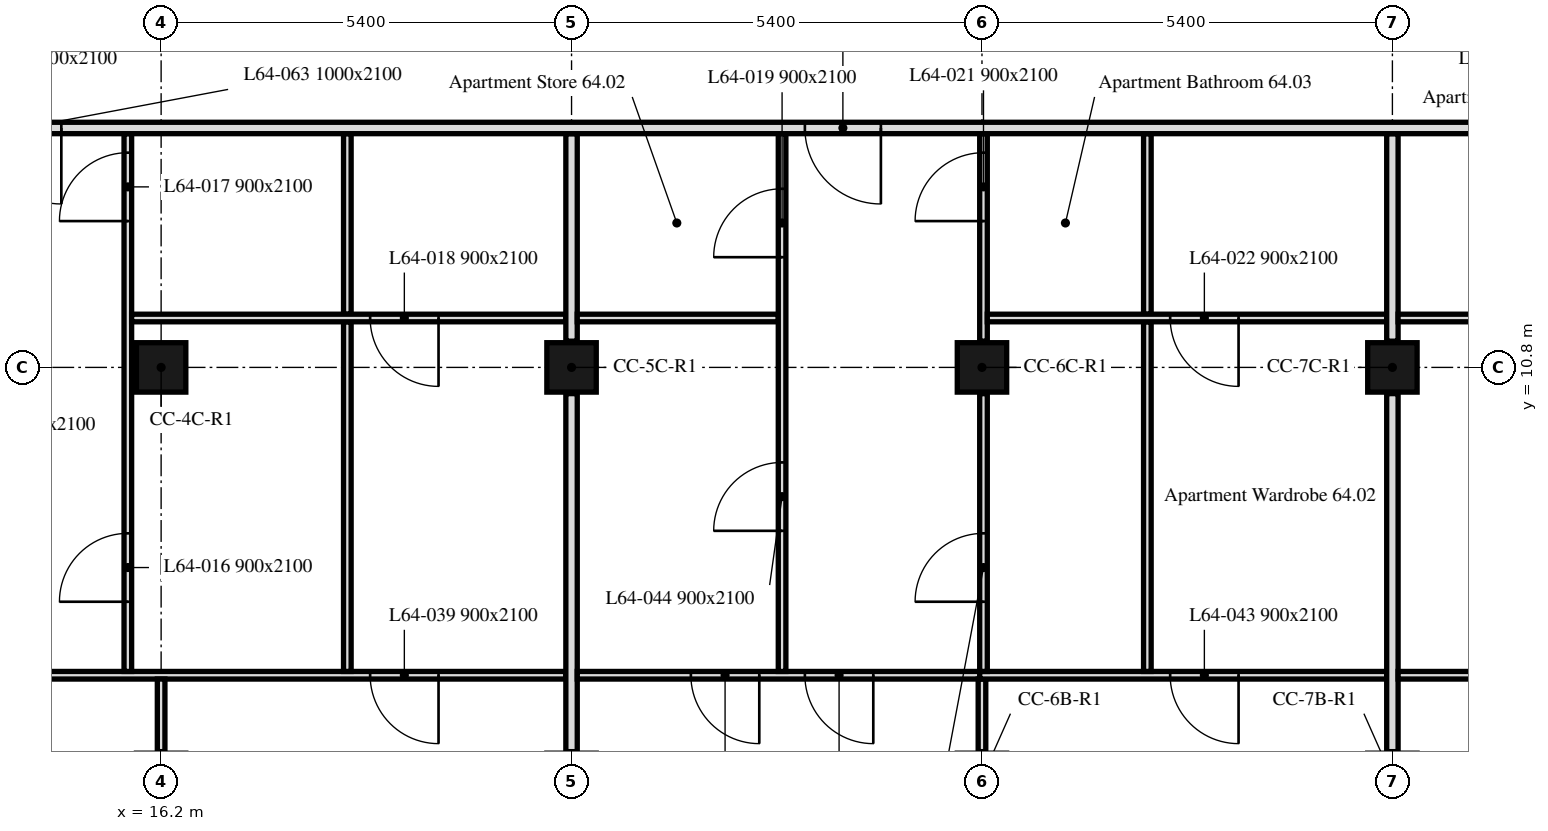
"""IFC4 building model, lengths in metres.
Left out: names, types, materials, properties, quantities, classifications, styles, units other than length and angle.
Written with IfcOpenShell. Run it as: python <this file> out.ifc"""

import sys

from ifc_helpers import new_model, si_unit, direction, frame, frame_2d, origin, origin_2d, place, context, subcontext, project, spatial, rectangle, extrude, element, fill, save


model = new_model("IFC4")
c1 = context("Model", 3, precision=1e-05, world=origin(), true_north=direction((0.0, 1.0)))
c2 = subcontext(c1, "Body", "Model", "MODEL_VIEW")
j1 = project(units=[si_unit("LENGTHUNIT", "METRE"), si_unit("PLANEANGLEUNIT", "RADIAN")], contexts=[c1])
p1 = place(None, origin())
s1 = spatial("IfcSite", under=j1, at=p1, CompositionType="ELEMENT")
p2 = place(p1, origin())
s2 = spatial("IfcBuilding", under=s1, at=p2, CompositionType="ELEMENT")
p3 = place(p2, frame((0.0, 0.0, 265.3)))
s3 = spatial("IfcBuildingStorey", under=s2, at=p3, CompositionType="ELEMENT", Elevation=265.3)
for number, where, z_axis, x_axis in (
    (1, (16.2, 10.8, 0.0), (0.0, 0.0, 1.0), (1.0, 0.0, 0.0)),
    (2, (21.6, 10.8, 0.0), (0.0, 0.0, 1.0), (1.0, 0.0, 0.0)),
    (3, (27.0, 10.8, 0.0), (0.0, 0.0, 1.0), (1.0, 0.0, 0.0)),
    (4, (32.4, 10.8, 0.0), (0.0, 0.0, 1.0), (1.0, 0.0, 0.0)),
):
    element("IfcColumn", number, at=place(p3, frame(where, z_axis=z_axis, x_axis=x_axis)), inside=s3, PredefinedType="COLUMN", context=c2, shape_type="SweptSolid", body=[
        extrude(rectangle(XDim=0.65, YDim=0.65, at=origin_2d()), origin(), (0.0, 0.0, 1.0), 3.0),
    ])
p4 = place(p3, frame((21.525, 6.75, 0.0), z_axis=(0.0, 0.0, 1.0), x_axis=(-1.0, 0.0, 0.0)))
e5 = element("IfcWall", 5, at=p4, inside=s3, PredefinedType="PARTITIONING", context=c2, shape_type="SweptSolid", body=[
    extrude(rectangle(XDim=10.65, YDim=0.1, at=frame_2d((5.325, 0.0))), origin(), (0.0, 0.0, 1.0), 2.4),
])
p5 = place(p4, frame((8.813, 0.0, 0.0)))
e6 = element("IfcOpeningElement", 6, at=p5, cuts=e5, PredefinedType="OPENING", context=c2, shape_type="SweptSolid", body=[
    extrude(rectangle(XDim=0.9, YDim=2.1, at=frame_2d((0.45, 1.05))), frame((0.0, 0.05, 0.0), z_axis=(0.0, -1.0, 0.0), x_axis=(1.0, 0.0, 0.0)), (0.0, 0.0, 1.0), 0.1),
])
p6 = place(p4, frame((1.675, 0.0, 0.0)))
e7 = element("IfcOpeningElement", 7, at=p6, cuts=e5, PredefinedType="OPENING", context=c2, shape_type="SweptSolid", body=[
    extrude(rectangle(XDim=0.9, YDim=2.1, at=frame_2d((0.45, 1.05))), frame((0.0, 0.05, 0.0), z_axis=(0.0, -1.0, 0.0), x_axis=(1.0, 0.0, 0.0)), (0.0, 0.0, 1.0), 0.1),
])
p7 = place(p4, frame((7.313, 0.0, 0.0)))
e8 = element("IfcOpeningElement", 8, at=p7, cuts=e5, PredefinedType="OPENING", context=c2, shape_type="SweptSolid", body=[
    extrude(rectangle(XDim=0.9, YDim=2.1, at=frame_2d((0.45, 1.05))), frame((0.0, 0.05, 0.0), z_axis=(0.0, -1.0, 0.0), x_axis=(1.0, 0.0, 0.0)), (0.0, 0.0, 1.0), 0.1),
])
p8 = place(p3, frame((16.2, 5.745, 0.0), z_axis=(0.0, 0.0, 1.0), x_axis=(0.0, 1.0, 0.0)))
e9 = element("IfcWall", 9, at=p8, inside=s3, PredefinedType="PARTITIONING", context=c2, shape_type="SweptSolid", body=[
    extrude(rectangle(XDim=0.955, YDim=0.1, at=frame_2d((0.478, 0.0))), origin(), (0.0, 0.0, 1.0), 2.4),
])
p9 = place(p3, frame((15.762, 6.8, 0.0), z_axis=(0.0, 0.0, 1.0), x_axis=(0.0, 1.0, 0.0)))
e10 = element("IfcWall", 10, at=p9, inside=s3, PredefinedType="PARTITIONING", context=c2, shape_type="SweptSolid", body=[
    extrude(rectangle(XDim=7.075, YDim=0.1, at=frame_2d((3.538, 0.0))), origin(), (0.0, 0.0, 1.0), 3.0),
])
p10 = place(p9, frame((0.917, 0.0, 0.0)))
e11 = element("IfcOpeningElement", 11, at=p10, cuts=e10, PredefinedType="OPENING", context=c2, shape_type="SweptSolid", body=[
    extrude(rectangle(XDim=0.9, YDim=2.1, at=frame_2d((0.45, 1.05))), frame((0.0, 0.05, 0.0), z_axis=(0.0, -1.0, 0.0), x_axis=(1.0, 0.0, 0.0)), (0.0, 0.0, 1.0), 0.1),
])
p11 = place(p9, frame((5.925, 0.0, 0.0)))
e12 = element("IfcOpeningElement", 12, at=p11, cuts=e10, PredefinedType="OPENING", context=c2, shape_type="SweptSolid", body=[
    extrude(rectangle(XDim=0.9, YDim=2.1, at=frame_2d((0.45, 1.05))), frame((0.0, 0.05, 0.0), z_axis=(0.0, -1.0, 0.0), x_axis=(1.0, 0.0, 0.0)), (0.0, 0.0, 1.0), 0.1),
])
p12 = place(p3, frame((18.65, 6.8, 0.0), z_axis=(0.0, 0.0, 1.0), x_axis=(0.0, 1.0, 0.0)))
e13 = element("IfcWall", 13, at=p12, inside=s3, PredefinedType="PARTITIONING", context=c2, shape_type="SweptSolid", body=[
    extrude(rectangle(XDim=4.6, YDim=0.1, at=frame_2d((2.3, 0.0))), origin(), (0.0, 0.0, 1.0), 3.0),
])
p13 = place(p3, frame((18.65, 11.5, 0.0), z_axis=(0.0, 0.0, 1.0), x_axis=(0.0, 1.0, 0.0)))
e14 = element("IfcWall", 14, at=p13, inside=s3, PredefinedType="PARTITIONING", context=c2, shape_type="SweptSolid", body=[
    extrude(rectangle(XDim=2.375, YDim=0.1, at=frame_2d((1.188, 0.0))), origin(), (0.0, 0.0, 1.0), 3.0),
])
p14 = place(p3, frame((21.525, 11.45, 0.0), z_axis=(0.0, 0.0, 1.0), x_axis=(-1.0, 0.0, 0.0)))
e15 = element("IfcWall", 15, at=p14, inside=s3, PredefinedType="PARTITIONING", context=c2, shape_type="SweptSolid", body=[
    extrude(rectangle(XDim=5.713, YDim=0.1, at=frame_2d((2.856, 0.0))), origin(), (0.0, 0.0, 1.0), 2.4),
])
p15 = place(p14, frame((1.675, 0.0, 0.0)))
e16 = element("IfcOpeningElement", 16, at=p15, cuts=e15, PredefinedType="OPENING", context=c2, shape_type="SweptSolid", body=[
    extrude(rectangle(XDim=0.9, YDim=2.1, at=frame_2d((0.45, 1.05))), frame((0.0, 0.05, 0.0), z_axis=(0.0, -1.0, 0.0), x_axis=(1.0, 0.0, 0.0)), (0.0, 0.0, 1.0), 0.1),
])
p16 = place(p3, frame((21.6, 5.745, 0.0), z_axis=(0.0, 0.0, 1.0), x_axis=(0.0, 1.0, 0.0)))
e17 = element("IfcWall", 17, at=p16, inside=s3, PredefinedType="PARTITIONING", context=c2, shape_type="SweptSolid", body=[
    extrude(rectangle(XDim=4.71, YDim=0.15, at=frame_2d((2.355, 0.0))), origin(), (0.0, 0.0, 1.0), 2.4),
])
p17 = place(p3, frame((21.6, 11.145, 0.0), z_axis=(0.0, 0.0, 1.0), x_axis=(0.0, 1.0, 0.0)))
e18 = element("IfcWall", 18, at=p17, inside=s3, PredefinedType="PARTITIONING", context=c2, shape_type="SweptSolid", body=[
    extrude(rectangle(XDim=2.73, YDim=0.15, at=frame_2d((1.365, 0.0))), origin(), (0.0, 0.0, 1.0), 2.4),
])
p18 = place(p3, frame((27.05, 6.75, 0.0), z_axis=(0.0, 0.0, 1.0), x_axis=(-1.0, 0.0, 0.0)))
e19 = element("IfcWall", 19, at=p18, inside=s3, PredefinedType="PARTITIONING", context=c2, shape_type="SweptSolid", body=[
    extrude(rectangle(XDim=5.375, YDim=0.1, at=frame_2d((2.688, 0.0))), origin(), (0.0, 0.0, 1.0), 3.0),
])
p19 = place(p18, frame((2.98, 0.0, 0.0)))
e20 = element("IfcOpeningElement", 20, at=p19, cuts=e19, PredefinedType="OPENING", context=c2, shape_type="SweptSolid", body=[
    extrude(rectangle(XDim=0.9, YDim=2.1, at=frame_2d((0.45, 1.05))), frame((0.0, 0.05, 0.0), z_axis=(0.0, -1.0, 0.0), x_axis=(1.0, 0.0, 0.0)), (0.0, 0.0, 1.0), 0.1),
])
p20 = place(p18, frame((1.48, 0.0, 0.0)))
e21 = element("IfcOpeningElement", 21, at=p20, cuts=e19, PredefinedType="OPENING", context=c2, shape_type="SweptSolid", body=[
    extrude(rectangle(XDim=0.9, YDim=2.1, at=frame_2d((0.45, 1.05))), frame((0.0, 0.05, 0.0), z_axis=(0.0, -1.0, 0.0), x_axis=(1.0, 0.0, 0.0)), (0.0, 0.0, 1.0), 0.1),
])
p21 = place(p3, frame((27.0, 5.745, 0.0), z_axis=(0.0, 0.0, 1.0), x_axis=(0.0, 1.0, 0.0)))
e22 = element("IfcWall", 22, at=p21, inside=s3, PredefinedType="PARTITIONING", context=c2, shape_type="SweptSolid", body=[
    extrude(rectangle(XDim=0.955, YDim=0.1, at=frame_2d((0.478, 0.0))), origin(), (0.0, 0.0, 1.0), 2.4),
])
p22 = place(p3, frame((32.325, 6.75, 0.0), z_axis=(0.0, 0.0, 1.0), x_axis=(-1.0, 0.0, 0.0)))
e23 = element("IfcWall", 23, at=p22, inside=s3, PredefinedType="PARTITIONING", context=c2, shape_type="SweptSolid", body=[
    extrude(rectangle(XDim=5.355, YDim=0.1, at=frame_2d((2.677, 0.0))), origin(), (0.0, 0.0, 1.0), 3.0),
])
p23 = place(p22, frame((1.949, 0.0, 0.0)))
e24 = element("IfcOpeningElement", 24, at=p23, cuts=e23, PredefinedType="OPENING", context=c2, shape_type="SweptSolid", body=[
    extrude(rectangle(XDim=0.9, YDim=2.1, at=frame_2d((0.45, 1.05))), frame((0.0, 0.05, 0.0), z_axis=(0.0, -1.0, 0.0), x_axis=(1.0, 0.0, 0.0)), (0.0, 0.0, 1.0), 0.1),
])
p24 = place(p3, frame((24.32, 11.45, 0.0), z_axis=(0.0, 0.0, 1.0), x_axis=(-1.0, 0.0, 0.0)))
e25 = element("IfcWall", 25, at=p24, inside=s3, PredefinedType="PARTITIONING", context=c2, shape_type="SweptSolid", body=[
    extrude(rectangle(XDim=2.645, YDim=0.1, at=frame_2d((1.323, 0.0))), origin(), (0.0, 0.0, 1.0), 3.0),
])
p25 = place(p3, frame((24.37, 6.8, 0.0), z_axis=(0.0, 0.0, 1.0), x_axis=(0.0, 1.0, 0.0)))
e26 = element("IfcWall", 26, at=p25, inside=s3, PredefinedType="PARTITIONING", context=c2, shape_type="SweptSolid", body=[
    extrude(rectangle(XDim=7.075, YDim=0.1, at=frame_2d((3.538, 0.0))), origin(), (0.0, 0.0, 1.0), 3.0),
])
p26 = place(p25, frame((5.45, 0.0, 0.0)))
e27 = element("IfcOpeningElement", 27, at=p26, cuts=e26, PredefinedType="OPENING", context=c2, shape_type="SweptSolid", body=[
    extrude(rectangle(XDim=0.9, YDim=2.1, at=frame_2d((0.45, 1.05))), frame((0.0, 0.05, 0.0), z_axis=(0.0, -1.0, 0.0), x_axis=(1.0, 0.0, 0.0)), (0.0, 0.0, 1.0), 0.1),
])
p27 = place(p25, frame((1.85, 0.0, 0.0)))
e28 = element("IfcOpeningElement", 28, at=p27, cuts=e26, PredefinedType="OPENING", context=c2, shape_type="SweptSolid", body=[
    extrude(rectangle(XDim=0.9, YDim=2.1, at=frame_2d((0.45, 1.05))), frame((0.0, 0.05, 0.0), z_axis=(0.0, -1.0, 0.0), x_axis=(1.0, 0.0, 0.0)), (0.0, 0.0, 1.0), 0.1),
])
p28 = place(p3, frame((27.02, 6.8, 0.0), z_axis=(0.0, 0.0, 1.0), x_axis=(0.0, 1.0, 0.0)))
e29 = element("IfcWall", 29, at=p28, inside=s3, PredefinedType="PARTITIONING", context=c2, shape_type="SweptSolid", body=[
    extrude(rectangle(XDim=3.655, YDim=0.1, at=frame_2d((1.828, 0.0))), origin(), (0.0, 0.0, 1.0), 2.4),
])
p29 = place(p28, frame((0.917, 0.0, 0.0)))
e30 = element("IfcOpeningElement", 30, at=p29, cuts=e29, PredefinedType="OPENING", context=c2, shape_type="SweptSolid", body=[
    extrude(rectangle(XDim=0.9, YDim=2.1, at=frame_2d((0.45, 1.05))), frame((0.0, 0.05, 0.0), z_axis=(0.0, -1.0, 0.0), x_axis=(1.0, 0.0, 0.0)), (0.0, 0.0, 1.0), 0.1),
])
p30 = place(p3, frame((27.02, 11.145, 0.0), z_axis=(0.0, 0.0, 1.0), x_axis=(0.0, 1.0, 0.0)))
e31 = element("IfcWall", 31, at=p30, inside=s3, PredefinedType="PARTITIONING", context=c2, shape_type="SweptSolid", body=[
    extrude(rectangle(XDim=2.73, YDim=0.1, at=frame_2d((1.365, 0.0))), origin(), (0.0, 0.0, 1.0), 2.4),
])
p31 = place(p30, frame((1.58, 0.0, 0.0)))
e32 = element("IfcOpeningElement", 32, at=p31, cuts=e31, PredefinedType="OPENING", context=c2, shape_type="SweptSolid", body=[
    extrude(rectangle(XDim=0.9, YDim=2.1, at=frame_2d((0.45, 1.05))), frame((0.0, 0.05, 0.0), z_axis=(0.0, -1.0, 0.0), x_axis=(1.0, 0.0, 0.0)), (0.0, 0.0, 1.0), 0.1),
])
p32 = place(p3, frame((29.176, 6.8, 0.0), z_axis=(0.0, 0.0, 1.0), x_axis=(0.0, 1.0, 0.0)))
e33 = element("IfcWall", 33, at=p32, inside=s3, PredefinedType="PARTITIONING", context=c2, shape_type="SweptSolid", body=[
    extrude(rectangle(XDim=4.6, YDim=0.1, at=frame_2d((2.3, 0.0))), origin(), (0.0, 0.0, 1.0), 3.0),
])
p33 = place(p3, frame((29.176, 11.5, 0.0), z_axis=(0.0, 0.0, 1.0), x_axis=(0.0, 1.0, 0.0)))
e34 = element("IfcWall", 34, at=p33, inside=s3, PredefinedType="PARTITIONING", context=c2, shape_type="SweptSolid", body=[
    extrude(rectangle(XDim=2.375, YDim=0.1, at=frame_2d((1.188, 0.0))), origin(), (0.0, 0.0, 1.0), 3.0),
])
p34 = place(p3, frame((32.325, 11.45, 0.0), z_axis=(0.0, 0.0, 1.0), x_axis=(-1.0, 0.0, 0.0)))
e35 = element("IfcWall", 35, at=p34, inside=s3, PredefinedType="PARTITIONING", context=c2, shape_type="SweptSolid", body=[
    extrude(rectangle(XDim=5.255, YDim=0.1, at=frame_2d((2.627, 0.0))), origin(), (0.0, 0.0, 1.0), 3.0),
])
p35 = place(p34, frame((1.949, 0.0, 0.0)))
e36 = element("IfcOpeningElement", 36, at=p35, cuts=e35, PredefinedType="OPENING", context=c2, shape_type="SweptSolid", body=[
    extrude(rectangle(XDim=0.9, YDim=2.1, at=frame_2d((0.45, 1.05))), frame((0.0, 0.05, 0.0), z_axis=(0.0, -1.0, 0.0), x_axis=(1.0, 0.0, 0.0)), (0.0, 0.0, 1.0), 0.1),
])
p36 = place(p3, frame((32.4, 5.745, 0.0), z_axis=(0.0, 0.0, 1.0), x_axis=(0.0, 1.0, 0.0)))
e37 = element("IfcWall", 37, at=p36, inside=s3, PredefinedType="PARTITIONING", context=c2, shape_type="SweptSolid", body=[
    extrude(rectangle(XDim=4.71, YDim=0.15, at=frame_2d((2.355, 0.0))), origin(), (0.0, 0.0, 1.0), 2.4),
])
p37 = place(p3, frame((32.4, 11.145, 0.0), z_axis=(0.0, 0.0, 1.0), x_axis=(0.0, 1.0, 0.0)))
e38 = element("IfcWall", 38, at=p37, inside=s3, PredefinedType="PARTITIONING", context=c2, shape_type="SweptSolid", body=[
    extrude(rectangle(XDim=2.73, YDim=0.15, at=frame_2d((1.365, 0.0))), origin(), (0.0, 0.0, 1.0), 2.4),
])
p38 = place(p3, frame((42.899, 6.75, 0.0), z_axis=(0.0, 0.0, 1.0), x_axis=(-1.0, 0.0, 0.0)))
e39 = element("IfcWall", 39, at=p38, inside=s3, PredefinedType="PARTITIONING", context=c2, shape_type="SweptSolid", body=[
    extrude(rectangle(XDim=10.424, YDim=0.1, at=frame_2d((5.212, 0.0))), origin(), (0.0, 0.0, 1.0), 2.4),
])
p39 = place(p38, frame((8.199, 0.0, 0.0)))
e40 = element("IfcOpeningElement", 40, at=p39, cuts=e39, PredefinedType="OPENING", context=c2, shape_type="SweptSolid", body=[
    extrude(rectangle(XDim=0.9, YDim=2.1, at=frame_2d((0.45, 1.05))), frame((0.0, 0.05, 0.0), z_axis=(0.0, -1.0, 0.0), x_axis=(1.0, 0.0, 0.0)), (0.0, 0.0, 1.0), 0.1),
])
p40 = place(p38, frame((3.643, 0.0, 0.0)))
e41 = element("IfcOpeningElement", 41, at=p40, cuts=e39, PredefinedType="OPENING", context=c2, shape_type="SweptSolid", body=[
    extrude(rectangle(XDim=0.9, YDim=2.1, at=frame_2d((0.45, 1.05))), frame((0.0, 0.05, 0.0), z_axis=(0.0, -1.0, 0.0), x_axis=(1.0, 0.0, 0.0)), (0.0, 0.0, 1.0), 0.1),
])
p41 = place(p3, frame((36.706, 11.45, 0.0), z_axis=(0.0, 0.0, 1.0), x_axis=(-1.0, 0.0, 0.0)))
e42 = element("IfcWall", 42, at=p41, inside=s3, PredefinedType="PARTITIONING", context=c2, shape_type="SweptSolid", body=[
    extrude(rectangle(XDim=4.231, YDim=0.1, at=frame_2d((2.115, 0.0))), origin(), (0.0, 0.0, 1.0), 3.0),
])
p42 = place(p41, frame((2.006, 0.0, 0.0)))
e43 = element("IfcOpeningElement", 43, at=p42, cuts=e42, PredefinedType="OPENING", context=c2, shape_type="SweptSolid", body=[
    extrude(rectangle(XDim=0.9, YDim=2.1, at=frame_2d((0.45, 1.05))), frame((0.0, 0.05, 0.0), z_axis=(0.0, -1.0, 0.0), x_axis=(1.0, 0.0, 0.0)), (0.0, 0.0, 1.0), 0.1),
])
p43 = place(p3, frame((47.849, 13.95, 0.0), z_axis=(0.0, 0.0, 1.0), x_axis=(-1.0, 0.0, 0.0)))
e44 = element("IfcWall", 44, at=p43, inside=s3, PredefinedType="PARTITIONING", context=c2, shape_type="SweptSolid", body=[
    extrude(rectangle(XDim=41.698, YDim=0.15, at=frame_2d((20.849, 0.0))), origin(), (0.0, 0.0, 1.0), 2.4),
])
p44 = place(p43, frame((37.749, 0.0, 0.0)))
e45 = element("IfcOpeningElement", 45, at=p44, cuts=e44, PredefinedType="OPENING", context=c2, shape_type="SweptSolid", body=[
    extrude(rectangle(XDim=1.0, YDim=2.1, at=frame_2d((0.5, 1.05))), frame((0.0, 0.075, 0.0), z_axis=(0.0, -1.0, 0.0), x_axis=(1.0, 0.0, 0.0)), (0.0, 0.0, 1.0), 0.15),
])
p45 = place(p43, frame((32.962, 0.0, 0.0)))
e46 = element("IfcOpeningElement", 46, at=p45, cuts=e44, PredefinedType="OPENING", context=c2, shape_type="SweptSolid", body=[
    extrude(rectangle(XDim=1.0, YDim=2.1, at=frame_2d((0.5, 1.05))), frame((0.0, 0.075, 0.0), z_axis=(0.0, -1.0, 0.0), x_axis=(1.0, 0.0, 0.0)), (0.0, 0.0, 1.0), 0.15),
])
p46 = place(p43, frame((22.179, 0.0, 0.0)))
e47 = element("IfcOpeningElement", 47, at=p46, cuts=e44, PredefinedType="OPENING", context=c2, shape_type="SweptSolid", body=[
    extrude(rectangle(XDim=1.0, YDim=2.1, at=frame_2d((0.5, 1.05))), frame((0.0, 0.075, 0.0), z_axis=(0.0, -1.0, 0.0), x_axis=(1.0, 0.0, 0.0)), (0.0, 0.0, 1.0), 0.15),
])
p47 = place(p43, frame((9.193, 0.0, 0.0)))
e48 = element("IfcOpeningElement", 48, at=p47, cuts=e44, PredefinedType="OPENING", context=c2, shape_type="SweptSolid", body=[
    extrude(rectangle(XDim=1.0, YDim=2.1, at=frame_2d((0.5, 1.05))), frame((0.0, 0.075, 0.0), z_axis=(0.0, -1.0, 0.0), x_axis=(1.0, 0.0, 0.0)), (0.0, 0.0, 1.0), 0.15),
])
p48 = place(p10, origin())
e49 = element("IfcDoor", 49, at=p48, inside=s3, OperationType="SINGLE_SWING_RIGHT", PredefinedType="DOOR", context=c2, shape_type="SweptSolid", body=[
    extrude(rectangle(XDim=0.9, YDim=2.1, at=frame_2d((0.45, 1.05))), frame((0.0, 0.025, 0.0), z_axis=(0.0, -1.0, 0.0), x_axis=(1.0, 0.0, 0.0)), (0.0, 0.0, 1.0), 0.05),
])
fill(e11, e49)
p49 = place(p11, origin())
e50 = element("IfcDoor", 50, at=p49, inside=s3, OperationType="SINGLE_SWING_RIGHT", PredefinedType="DOOR", context=c2, shape_type="SweptSolid", body=[
    extrude(rectangle(XDim=0.9, YDim=2.1, at=frame_2d((0.45, 1.05))), frame((0.0, 0.025, 0.0), z_axis=(0.0, -1.0, 0.0), x_axis=(1.0, 0.0, 0.0)), (0.0, 0.0, 1.0), 0.05),
])
fill(e12, e50)
p50 = place(p15, origin())
e51 = element("IfcDoor", 51, at=p50, inside=s3, OperationType="SINGLE_SWING_RIGHT", PredefinedType="DOOR", context=c2, shape_type="SweptSolid", body=[
    extrude(rectangle(XDim=0.9, YDim=2.1, at=frame_2d((0.45, 1.05))), frame((0.0, 0.025, 0.0), z_axis=(0.0, -1.0, 0.0), x_axis=(1.0, 0.0, 0.0)), (0.0, 0.0, 1.0), 0.05),
])
fill(e16, e51)
p51 = place(p26, origin())
e52 = element("IfcDoor", 52, at=p51, inside=s3, OperationType="SINGLE_SWING_RIGHT", PredefinedType="DOOR", context=c2, shape_type="SweptSolid", body=[
    extrude(rectangle(XDim=0.9, YDim=2.1, at=frame_2d((0.45, 1.05))), frame((0.0, 0.025, 0.0), z_axis=(0.0, -1.0, 0.0), x_axis=(1.0, 0.0, 0.0)), (0.0, 0.0, 1.0), 0.05),
])
fill(e27, e52)
p52 = place(p29, origin())
e53 = element("IfcDoor", 53, at=p52, inside=s3, OperationType="SINGLE_SWING_LEFT", PredefinedType="DOOR", context=c2, shape_type="SweptSolid", body=[
    extrude(rectangle(XDim=0.9, YDim=2.1, at=frame_2d((0.45, 1.05))), frame((0.0, 0.025, 0.0), z_axis=(0.0, -1.0, 0.0), x_axis=(1.0, 0.0, 0.0)), (0.0, 0.0, 1.0), 0.05),
])
fill(e30, e53)
p53 = place(p31, origin())
e54 = element("IfcDoor", 54, at=p53, inside=s3, OperationType="SINGLE_SWING_LEFT", PredefinedType="DOOR", context=c2, shape_type="SweptSolid", body=[
    extrude(rectangle(XDim=0.9, YDim=2.1, at=frame_2d((0.45, 1.05))), frame((0.0, 0.025, 0.0), z_axis=(0.0, -1.0, 0.0), x_axis=(1.0, 0.0, 0.0)), (0.0, 0.0, 1.0), 0.05),
])
fill(e32, e54)
p54 = place(p35, origin())
e55 = element("IfcDoor", 55, at=p54, inside=s3, OperationType="SINGLE_SWING_LEFT", PredefinedType="DOOR", context=c2, shape_type="SweptSolid", body=[
    extrude(rectangle(XDim=0.9, YDim=2.1, at=frame_2d((0.45, 1.05))), frame((0.0, 0.025, 0.0), z_axis=(0.0, -1.0, 0.0), x_axis=(1.0, 0.0, 0.0)), (0.0, 0.0, 1.0), 0.05),
])
fill(e36, e55)
p55 = place(p6, origin())
e56 = element("IfcDoor", 56, at=p55, inside=s3, OperationType="SINGLE_SWING_LEFT", PredefinedType="DOOR", context=c2, shape_type="SweptSolid", body=[
    extrude(rectangle(XDim=0.9, YDim=2.1, at=frame_2d((0.45, 1.05))), frame((0.0, 0.025, 0.0), z_axis=(0.0, -1.0, 0.0), x_axis=(1.0, 0.0, 0.0)), (0.0, 0.0, 1.0), 0.05),
])
fill(e7, e56)
p56 = place(p19, origin())
e57 = element("IfcDoor", 57, at=p56, inside=s3, OperationType="SINGLE_SWING_RIGHT", PredefinedType="DOOR", context=c2, shape_type="SweptSolid", body=[
    extrude(rectangle(XDim=0.9, YDim=2.1, at=frame_2d((0.45, 1.05))), frame((0.0, 0.025, 0.0), z_axis=(0.0, -1.0, 0.0), x_axis=(1.0, 0.0, 0.0)), (0.0, 0.0, 1.0), 0.05),
])
fill(e20, e57)
p57 = place(p23, origin())
e58 = element("IfcDoor", 58, at=p57, inside=s3, OperationType="SINGLE_SWING_LEFT", PredefinedType="DOOR", context=c2, shape_type="SweptSolid", body=[
    extrude(rectangle(XDim=0.9, YDim=2.1, at=frame_2d((0.45, 1.05))), frame((0.0, 0.025, 0.0), z_axis=(0.0, -1.0, 0.0), x_axis=(1.0, 0.0, 0.0)), (0.0, 0.0, 1.0), 0.05),
])
fill(e24, e58)
p58 = place(p27, origin())
e59 = element("IfcDoor", 59, at=p58, inside=s3, OperationType="SINGLE_SWING_LEFT", PredefinedType="DOOR", context=c2, shape_type="SweptSolid", body=[
    extrude(rectangle(XDim=0.9, YDim=2.1, at=frame_2d((0.45, 1.05))), frame((0.0, 0.025, 0.0), z_axis=(0.0, -1.0, 0.0), x_axis=(1.0, 0.0, 0.0)), (0.0, 0.0, 1.0), 0.05),
])
fill(e28, e59)
p59 = place(p20, origin())
e60 = element("IfcDoor", 60, at=p59, inside=s3, OperationType="SINGLE_SWING_LEFT", PredefinedType="DOOR", context=c2, shape_type="SweptSolid", body=[
    extrude(rectangle(XDim=0.9, YDim=2.1, at=frame_2d((0.45, 1.05))), frame((0.0, 0.025, 0.0), z_axis=(0.0, -1.0, 0.0), x_axis=(1.0, 0.0, 0.0)), (0.0, 0.0, 1.0), 0.05),
])
fill(e21, e60)
p60 = place(p45, origin())
e61 = element("IfcDoor", 61, at=p60, inside=s3, OperationType="SINGLE_SWING_LEFT", PredefinedType="DOOR", context=c2, shape_type="SweptSolid", body=[
    extrude(rectangle(XDim=1.0, YDim=2.1, at=frame_2d((0.5, 1.05))), frame((0.0, 0.025, 0.0), z_axis=(0.0, -1.0, 0.0), x_axis=(1.0, 0.0, 0.0)), (0.0, 0.0, 1.0), 0.05),
])
fill(e46, e61)
p61 = place(p46, origin())
e62 = element("IfcDoor", 62, at=p61, inside=s3, OperationType="SINGLE_SWING_RIGHT", PredefinedType="DOOR", context=c2, shape_type="SweptSolid", body=[
    extrude(rectangle(XDim=1.0, YDim=2.1, at=frame_2d((0.5, 1.05))), frame((0.0, 0.025, 0.0), z_axis=(0.0, -1.0, 0.0), x_axis=(1.0, 0.0, 0.0)), (0.0, 0.0, 1.0), 0.05),
])
fill(e47, e62)
save(model, sys.argv[1])
